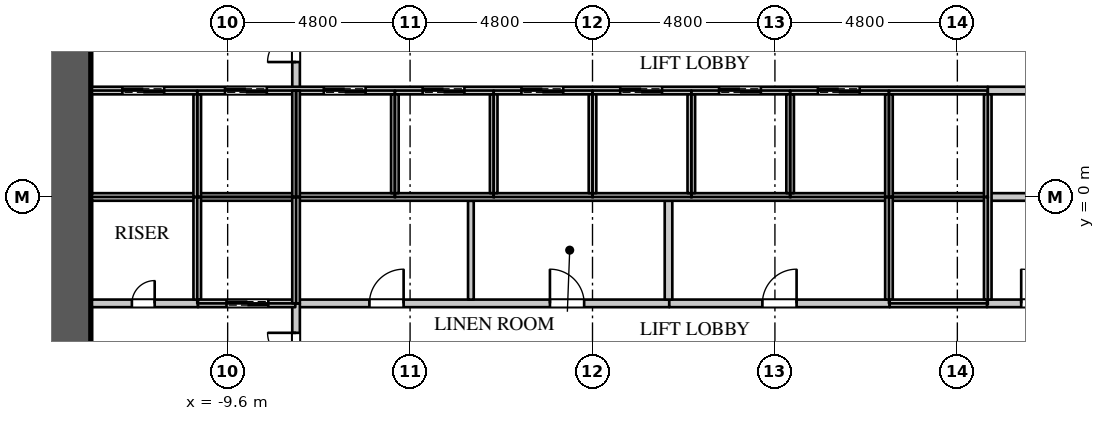
"""IFC4 building model, lengths in metres.
Left out: names, types, materials, properties, quantities, classifications, styles, units other than length and angle.
Written with IfcOpenShell. Run it as: python <this file> out.ifc"""

import sys

from ifc_helpers import new_model, si_unit, direction, frame, frame_2d, origin, place, context, subcontext, project, spatial, rectangle, extrude, element, fill, save


model = new_model("IFC4")
c1 = context("Model", 3, precision=1e-05, world=origin(), true_north=direction((0.0, 1.0)))
c2 = subcontext(c1, "Body", "Model", "MODEL_VIEW")
j1 = project(units=[si_unit("LENGTHUNIT", "METRE"), si_unit("PLANEANGLEUNIT", "RADIAN")], contexts=[c1])
p1 = place(None, origin())
s1 = spatial("IfcSite", under=j1, at=p1, CompositionType="ELEMENT")
p2 = place(p1, origin())
s2 = spatial("IfcBuilding", under=s1, at=p2, CompositionType="ELEMENT")
p3 = place(p2, frame((0.0, 0.0, 16.0)))
s3 = spatial("IfcBuildingStorey", under=s2, at=p3, CompositionType="ELEMENT", Elevation=16.0)
p4 = place(p3, frame((-13.8, -10.8, 0.0), z_axis=(0.0, 0.0, 1.0), x_axis=(0.0, 1.0, 0.0)))
e1 = element("IfcWall", 1, at=p4, inside=s3, PredefinedType="SHEAR", context=c2, shape_type="SweptSolid", body=[
    extrude(rectangle(XDim=21.6, YDim=1.2, at=frame_2d((10.8, 0.0))), origin(), (0.0, 0.0, 1.0), 5.0),
])
p5 = place(p4, frame((15.5, 0.0, 0.0)))
e2 = element("IfcOpeningElement", 2, at=p5, cuts=e1, PredefinedType="OPENING", context=c2, shape_type="SweptSolid", body=[
    extrude(rectangle(XDim=1.5, YDim=2.4, at=frame_2d((0.75, 1.2))), frame((0.0, 0.61, 0.0), z_axis=(0.0, -1.0, 0.0), x_axis=(1.0, 0.0, 0.0)), (0.0, 0.0, 1.0), 1.22),
])
p6 = place(p4, frame((4.5, 0.0, 0.0)))
e3 = element("IfcOpeningElement", 3, at=p6, cuts=e1, PredefinedType="OPENING", context=c2, shape_type="SweptSolid", body=[
    extrude(rectangle(XDim=1.5, YDim=2.4, at=frame_2d((0.75, 1.2))), frame((0.0, 0.61, 0.0), z_axis=(0.0, -1.0, 0.0), x_axis=(1.0, 0.0, 0.0)), (0.0, 0.0, 1.0), 1.22),
])
p7 = place(p3, frame((-7.82, -2.8, 0.0), z_axis=(0.0, 0.0, 1.0), x_axis=(1.0, 0.0, 0.0)))
e4 = element("IfcWall", 4, at=p7, inside=s3, PredefinedType="PARTITIONING", context=c2, shape_type="SweptSolid", body=[
    extrude(rectangle(XDim=9.84, YDim=0.2, at=frame_2d((4.92, 0.0))), origin(), (0.0, 0.0, 1.0), 4.4),
])
p8 = place(p7, frame((1.95, 0.0, 0.0)))
e5 = element("IfcOpeningElement", 5, at=p8, cuts=e4, PredefinedType="OPENING", context=c2, shape_type="SweptSolid", body=[
    extrude(rectangle(XDim=0.9, YDim=2.2, at=frame_2d((0.45, 1.1))), frame((0.0, 0.11, 0.0), z_axis=(0.0, -1.0, 0.0), x_axis=(1.0, 0.0, 0.0)), (0.0, 0.0, 1.0), 0.22),
])
p9 = place(p7, frame((6.7, 0.0, 0.0)))
e6 = element("IfcOpeningElement", 6, at=p9, cuts=e4, PredefinedType="OPENING", context=c2, shape_type="SweptSolid", body=[
    extrude(rectangle(XDim=0.9, YDim=2.2, at=frame_2d((0.45, 1.1))), frame((0.0, 0.11, 0.0), z_axis=(0.0, -1.0, 0.0), x_axis=(1.0, 0.0, 0.0)), (0.0, 0.0, 1.0), 0.22),
])
p10 = place(p3, frame((-7.8, -8.075, 0.0), z_axis=(0.0, 0.0, 1.0), x_axis=(0.0, 1.0, 0.0)))
e7 = element("IfcWall", 7, at=p10, inside=s3, PredefinedType="PARTITIONING", context=c2, shape_type="SweptSolid", body=[
    extrude(rectangle(XDim=5.275, YDim=0.2, at=frame_2d((2.637, 0.0))), origin(), (0.0, 0.0, 1.0), 4.4),
])
p11 = place(p10, frame((3.0, 0.0, 0.0)))
e8 = element("IfcOpeningElement", 8, at=p11, cuts=e7, PredefinedType="OPENING", context=c2, shape_type="SweptSolid", body=[
    extrude(rectangle(XDim=1.5, YDim=2.4, at=frame_2d((0.75, 1.2))), frame((0.0, 0.11, 0.0), z_axis=(0.0, -1.0, 0.0), x_axis=(1.0, 0.0, 0.0)), (0.0, 0.0, 1.0), 0.22),
])
p12 = place(p3, frame((-7.8, 2.8, 0.0), z_axis=(0.0, 0.0, 1.0), x_axis=(0.0, 1.0, 0.0)))
e9 = element("IfcWall", 9, at=p12, inside=s3, PredefinedType="PARTITIONING", context=c2, shape_type="SweptSolid", body=[
    extrude(rectangle(XDim=5.275, YDim=0.2, at=frame_2d((2.637, 0.0))), origin(), (0.0, 0.0, 1.0), 4.4),
])
p13 = place(p12, frame((0.75, 0.0, 0.0)))
e10 = element("IfcOpeningElement", 10, at=p13, cuts=e9, PredefinedType="OPENING", context=c2, shape_type="SweptSolid", body=[
    extrude(rectangle(XDim=1.5, YDim=2.4, at=frame_2d((0.75, 1.2))), frame((0.0, 0.11, 0.0), z_axis=(0.0, -1.0, 0.0), x_axis=(1.0, 0.0, 0.0)), (0.0, 0.0, 1.0), 0.22),
])
p14 = place(p3, frame((-3.2, -2.7, 0.0), z_axis=(0.0, 0.0, 1.0), x_axis=(0.0, 1.0, 0.0)))
e11 = element("IfcWall", 11, at=p14, inside=s3, PredefinedType="PARTITIONING", context=c2, shape_type="SweptSolid", body=[
    extrude(rectangle(XDim=2.6, YDim=0.15, at=frame_2d((1.3, 0.0))), origin(), (0.0, 0.0, 1.0), 4.4),
])
p15 = place(p3, frame((-13.17, -2.8, 0.0), z_axis=(0.0, 0.0, 1.0), x_axis=(1.0, 0.0, 0.0)))
e12 = element("IfcWall", 12, at=p15, inside=s3, PredefinedType="PARTITIONING", context=c2, shape_type="SweptSolid", body=[
    extrude(rectangle(XDim=2.79, YDim=0.2, at=frame_2d((1.395, 0.0))), origin(), (0.0, 0.0, 1.0), 4.4),
])
p16 = place(p15, frame((1.05, 0.0, 0.0)))
e13 = element("IfcOpeningElement", 13, at=p16, cuts=e12, PredefinedType="OPENING", context=c2, shape_type="SweptSolid", body=[
    extrude(rectangle(XDim=0.6, YDim=2.0, at=frame_2d((0.3, 1.0))), frame((0.0, 0.11, 0.0), z_axis=(0.0, -1.0, 0.0), x_axis=(1.0, 0.0, 0.0)), (0.0, 0.0, 1.0), 0.22),
])
p17 = place(p3, frame((2.02, -2.8, 0.0), z_axis=(0.0, 0.0, 1.0), x_axis=(1.0, 0.0, 0.0)))
e14 = element("IfcWall", 14, at=p17, inside=s3, PredefinedType="PARTITIONING", context=c2, shape_type="SweptSolid", body=[
    extrude(rectangle(XDim=5.8, YDim=0.2, at=frame_2d((2.9, 0.0))), origin(), (0.0, 0.0, 1.0), 4.4),
])
p18 = place(p17, frame((2.45, 0.0, 0.0)))
e15 = element("IfcOpeningElement", 15, at=p18, cuts=e14, PredefinedType="OPENING", context=c2, shape_type="SweptSolid", body=[
    extrude(rectangle(XDim=0.9, YDim=2.2, at=frame_2d((0.45, 1.1))), frame((0.0, 0.11, 0.0), z_axis=(0.0, -1.0, 0.0), x_axis=(1.0, 0.0, 0.0)), (0.0, 0.0, 1.0), 0.22),
])
p19 = place(p3, frame((2.0, -2.7, 0.0), z_axis=(0.0, 0.0, 1.0), x_axis=(0.0, 1.0, 0.0)))
e16 = element("IfcWall", 16, at=p19, inside=s3, PredefinedType="PARTITIONING", context=c2, shape_type="SweptSolid", body=[
    extrude(rectangle(XDim=2.6, YDim=0.2, at=frame_2d((1.3, 0.0))), origin(), (0.0, 0.0, 1.0), 4.4),
])
p20 = place(p3, frame((10.38, -2.8, 0.0), z_axis=(0.0, 0.0, 1.0), x_axis=(1.0, 0.0, 0.0)))
e17 = element("IfcWall", 17, at=p20, inside=s3, PredefinedType="PARTITIONING", context=c2, shape_type="SweptSolid", body=[
    extrude(rectangle(XDim=2.79, YDim=0.2, at=frame_2d((1.395, 0.0))), origin(), (0.0, 0.0, 1.0), 4.4),
])
p21 = place(p20, frame((0.9, 0.0, 0.0)))
e18 = element("IfcOpeningElement", 18, at=p21, cuts=e17, PredefinedType="OPENING", context=c2, shape_type="SweptSolid", body=[
    extrude(rectangle(XDim=0.9, YDim=2.2, at=frame_2d((0.45, 1.1))), frame((0.0, 0.11, 0.0), z_axis=(0.0, -1.0, 0.0), x_axis=(1.0, 0.0, 0.0)), (0.0, 0.0, 1.0), 0.22),
])
p22 = place(p3, frame((10.4, 2.8, 0.0), z_axis=(0.0, 0.0, 1.0), x_axis=(1.0, 0.0, 0.0)))
e19 = element("IfcWall", 19, at=p22, inside=s3, PredefinedType="PARTITIONING", context=c2, shape_type="SweptSolid", body=[
    extrude(rectangle(XDim=2.77, YDim=0.2, at=frame_2d((1.385, 0.0))), origin(), (0.0, 0.0, 1.0), 4.4),
])
p23 = place(p22, frame((1.05, 0.0, 0.0)))
e20 = element("IfcOpeningElement", 20, at=p23, cuts=e19, PredefinedType="OPENING", context=c2, shape_type="SweptSolid", body=[
    extrude(rectangle(XDim=0.6, YDim=2.0, at=frame_2d((0.3, 1.0))), frame((0.0, 0.11, 0.0), z_axis=(0.0, -1.0, 0.0), x_axis=(1.0, 0.0, 0.0)), (0.0, 0.0, 1.0), 0.22),
])
p24 = place(p3, frame((10.4, 0.0, 0.0), z_axis=(0.0, 0.0, 1.0), x_axis=(1.0, 0.0, 0.0)))
e21 = element("IfcWall", 21, at=p24, inside=s3, PredefinedType="PARTITIONING", context=c2, shape_type="SweptSolid", body=[
    extrude(rectangle(XDim=2.77, YDim=0.2, at=frame_2d((1.385, 0.0))), origin(), (0.0, 0.0, 1.0), 4.4),
])
p25 = place(p3, frame((-13.17, 0.0, 0.0), z_axis=(0.0, 0.0, 1.0), x_axis=(1.0, 0.0, 0.0)))
e22 = element("IfcWall", 22, at=p25, inside=s3, PredefinedType="PARTITIONING", context=c2, shape_type="SweptSolid", body=[
    extrude(rectangle(XDim=23.57, YDim=0.2, at=frame_2d((11.785, 0.0))), origin(), (0.0, 0.0, 1.0), 4.4),
])
p26 = place(p3, frame((-13.17, 2.8, 0.0), z_axis=(0.0, 0.0, 1.0), x_axis=(1.0, 0.0, 0.0)))
e23 = element("IfcWall", 23, at=p26, inside=s3, PredefinedType="PARTITIONING", context=c2, shape_type="SweptSolid", body=[
    extrude(rectangle(XDim=23.57, YDim=0.2, at=frame_2d((11.785, 0.0))), origin(), (0.0, 0.0, 1.0), 4.4),
])
p27 = place(p26, frame((0.8, 0.0, 0.0)))
e24 = element("IfcOpeningElement", 24, at=p27, cuts=e23, PredefinedType="OPENING", context=c2, shape_type="SweptSolid", body=[
    extrude(rectangle(XDim=1.1, YDim=2.2, at=frame_2d((0.55, 1.1))), frame((0.0, 0.11, 0.0), z_axis=(0.0, -1.0, 0.0), x_axis=(1.0, 0.0, 0.0)), (0.0, 0.0, 1.0), 0.22),
])
p28 = place(p26, frame((3.5, 0.0, 0.0)))
e25 = element("IfcOpeningElement", 25, at=p28, cuts=e23, PredefinedType="OPENING", context=c2, shape_type="SweptSolid", body=[
    extrude(rectangle(XDim=1.1, YDim=2.2, at=frame_2d((0.55, 1.1))), frame((0.0, 0.11, 0.0), z_axis=(0.0, -1.0, 0.0), x_axis=(1.0, 0.0, 0.0)), (0.0, 0.0, 1.0), 0.22),
])
p29 = place(p26, frame((6.1, 0.0, 0.0)))
e26 = element("IfcOpeningElement", 26, at=p29, cuts=e23, PredefinedType="OPENING", context=c2, shape_type="SweptSolid", body=[
    extrude(rectangle(XDim=1.1, YDim=2.2, at=frame_2d((0.55, 1.1))), frame((0.0, 0.11, 0.0), z_axis=(0.0, -1.0, 0.0), x_axis=(1.0, 0.0, 0.0)), (0.0, 0.0, 1.0), 0.22),
])
p30 = place(p26, frame((8.7, 0.0, 0.0)))
e27 = element("IfcOpeningElement", 27, at=p30, cuts=e23, PredefinedType="OPENING", context=c2, shape_type="SweptSolid", body=[
    extrude(rectangle(XDim=1.1, YDim=2.2, at=frame_2d((0.55, 1.1))), frame((0.0, 0.11, 0.0), z_axis=(0.0, -1.0, 0.0), x_axis=(1.0, 0.0, 0.0)), (0.0, 0.0, 1.0), 0.22),
])
p31 = place(p26, frame((11.3, 0.0, 0.0)))
e28 = element("IfcOpeningElement", 28, at=p31, cuts=e23, PredefinedType="OPENING", context=c2, shape_type="SweptSolid", body=[
    extrude(rectangle(XDim=1.1, YDim=2.2, at=frame_2d((0.55, 1.1))), frame((0.0, 0.11, 0.0), z_axis=(0.0, -1.0, 0.0), x_axis=(1.0, 0.0, 0.0)), (0.0, 0.0, 1.0), 0.22),
])
p32 = place(p26, frame((13.9, 0.0, 0.0)))
e29 = element("IfcOpeningElement", 29, at=p32, cuts=e23, PredefinedType="OPENING", context=c2, shape_type="SweptSolid", body=[
    extrude(rectangle(XDim=1.1, YDim=2.2, at=frame_2d((0.55, 1.1))), frame((0.0, 0.11, 0.0), z_axis=(0.0, -1.0, 0.0), x_axis=(1.0, 0.0, 0.0)), (0.0, 0.0, 1.0), 0.22),
])
p33 = place(p26, frame((16.5, 0.0, 0.0)))
e30 = element("IfcOpeningElement", 30, at=p33, cuts=e23, PredefinedType="OPENING", context=c2, shape_type="SweptSolid", body=[
    extrude(rectangle(XDim=1.1, YDim=2.2, at=frame_2d((0.55, 1.1))), frame((0.0, 0.11, 0.0), z_axis=(0.0, -1.0, 0.0), x_axis=(1.0, 0.0, 0.0)), (0.0, 0.0, 1.0), 0.22),
])
p34 = place(p26, frame((19.1, 0.0, 0.0)))
e31 = element("IfcOpeningElement", 31, at=p34, cuts=e23, PredefinedType="OPENING", context=c2, shape_type="SweptSolid", body=[
    extrude(rectangle(XDim=1.1, YDim=2.2, at=frame_2d((0.55, 1.1))), frame((0.0, 0.11, 0.0), z_axis=(0.0, -1.0, 0.0), x_axis=(1.0, 0.0, 0.0)), (0.0, 0.0, 1.0), 0.22),
])
p35 = place(p3, frame((-10.4, -2.7, 0.0), z_axis=(0.0, 0.0, 1.0), x_axis=(0.0, 1.0, 0.0)))
e32 = element("IfcWall", 32, at=p35, inside=s3, PredefinedType="PARTITIONING", context=c2, shape_type="SweptSolid", body=[
    extrude(rectangle(XDim=2.7, YDim=0.2, at=frame_2d((1.35, 0.0))), origin(), (0.0, 0.0, 1.0), 4.4),
])
p36 = place(p3, frame((-10.38, -2.8, 0.0), z_axis=(0.0, 0.0, 1.0), x_axis=(1.0, 0.0, 0.0)))
e33 = element("IfcWall", 33, at=p36, inside=s3, PredefinedType="PARTITIONING", context=c2, shape_type="SweptSolid", body=[
    extrude(rectangle(XDim=2.56, YDim=0.2, at=frame_2d((1.28, 0.0))), origin(), (0.0, 0.0, 1.0), 4.4),
])
p37 = place(p36, frame((0.75, 0.0, 0.0)))
e34 = element("IfcOpeningElement", 34, at=p37, cuts=e33, PredefinedType="OPENING", context=c2, shape_type="SweptSolid", body=[
    extrude(rectangle(XDim=1.1, YDim=2.2, at=frame_2d((0.55, 1.1))), frame((0.0, 0.11, 0.0), z_axis=(0.0, -1.0, 0.0), x_axis=(1.0, 0.0, 0.0)), (0.0, 0.0, 1.0), 0.22),
])
p38 = place(p3, frame((-10.4, 0.0, 0.0), z_axis=(0.0, 0.0, 1.0), x_axis=(0.0, 1.0, 0.0)))
e35 = element("IfcWall", 35, at=p38, inside=s3, PredefinedType="PARTITIONING", context=c2, shape_type="SweptSolid", body=[
    extrude(rectangle(XDim=2.7, YDim=0.2, at=frame_2d((1.35, 0.0))), origin(), (0.0, 0.0, 1.0), 4.4),
])
for number, where, z_axis, x_axis in (
    (36, (-7.8, -2.8, 0.0), (0.0, 0.0, 1.0), (0.0, 1.0, 0.0)),
    (37, (-7.8, 0.0, 0.0), (0.0, 0.0, 1.0), (0.0, 1.0, 0.0)),
):
    element("IfcWall", number, at=place(p3, frame(where, z_axis=z_axis, x_axis=x_axis)), inside=s3, PredefinedType="PARTITIONING", context=c2, shape_type="SweptSolid", body=[
        extrude(rectangle(XDim=2.8, YDim=0.2, at=frame_2d((1.4, 0.0))), origin(), (0.0, 0.0, 1.0), 4.4),
    ])
for number, where, z_axis, x_axis in (
    (38, (-5.2, 0.1, 0.0), (0.0, 0.0, 1.0), (0.0, 1.0, 0.0)),
    (39, (-2.6, 0.1, 0.0), (0.0, 0.0, 1.0), (0.0, 1.0, 0.0)),
    (40, (0.0, 0.1, 0.0), (0.0, 0.0, 1.0), (0.0, 1.0, 0.0)),
    (41, (2.6, 0.1, 0.0), (0.0, 0.0, 1.0), (0.0, 1.0, 0.0)),
    (42, (5.2, 0.1, 0.0), (0.0, 0.0, 1.0), (0.0, 1.0, 0.0)),
):
    element("IfcWall", number, at=place(p3, frame(where, z_axis=z_axis, x_axis=x_axis)), inside=s3, PredefinedType="PARTITIONING", context=c2, shape_type="SweptSolid", body=[
        extrude(rectangle(XDim=2.6, YDim=0.2, at=frame_2d((1.3, 0.0))), origin(), (0.0, 0.0, 1.0), 4.4),
    ])
p39 = place(p3, frame((7.8, -2.7, 0.0), z_axis=(0.0, 0.0, 1.0), x_axis=(0.0, 1.0, 0.0)))
e43 = element("IfcWall", 43, at=p39, inside=s3, PredefinedType="PARTITIONING", context=c2, shape_type="SweptSolid", body=[
    extrude(rectangle(XDim=2.7, YDim=0.2, at=frame_2d((1.35, 0.0))), origin(), (0.0, 0.0, 1.0), 4.4),
])
p40 = place(p3, frame((7.82, -2.8, 0.0), z_axis=(0.0, 0.0, 1.0), x_axis=(1.0, 0.0, 0.0)))
e44 = element("IfcWall", 44, at=p40, inside=s3, PredefinedType="PARTITIONING", context=c2, shape_type="SweptSolid", body=[
    extrude(rectangle(XDim=2.56, YDim=0.2, at=frame_2d((1.28, 0.0))), origin(), (0.0, 0.0, 1.0), 4.4),
])
p41 = place(p3, frame((7.8, 0.0, 0.0), z_axis=(0.0, 0.0, 1.0), x_axis=(0.0, 1.0, 0.0)))
e45 = element("IfcWall", 45, at=p41, inside=s3, PredefinedType="PARTITIONING", context=c2, shape_type="SweptSolid", body=[
    extrude(rectangle(XDim=2.7, YDim=0.2, at=frame_2d((1.35, 0.0))), origin(), (0.0, 0.0, 1.0), 4.4),
])
p42 = place(p3, frame((10.4, -2.7, 0.0), z_axis=(0.0, 0.0, 1.0), x_axis=(0.0, 1.0, 0.0)))
e46 = element("IfcWall", 46, at=p42, inside=s3, PredefinedType="PARTITIONING", context=c2, shape_type="SweptSolid", body=[
    extrude(rectangle(XDim=5.4, YDim=0.2, at=frame_2d((2.7, 0.0))), origin(), (0.0, 0.0, 1.0), 4.4),
])
p43 = place(p16, origin())
e47 = element("IfcDoor", 47, at=p43, inside=s3, OperationType="SINGLE_SWING_RIGHT", PredefinedType="DOOR", context=c2, shape_type="SweptSolid", body=[
    extrude(rectangle(XDim=0.6, YDim=2.0, at=frame_2d((0.3, 1.0))), frame((0.0, 0.025, 0.0), z_axis=(0.0, -1.0, 0.0), x_axis=(1.0, 0.0, 0.0)), (0.0, 0.0, 1.0), 0.05),
])
fill(e13, e47)
p44 = place(p21, origin())
e48 = element("IfcDoor", 48, at=p44, inside=s3, OperationType="SINGLE_SWING_LEFT", PredefinedType="DOOR", context=c2, shape_type="SweptSolid", body=[
    extrude(rectangle(XDim=0.9, YDim=2.2, at=frame_2d((0.45, 1.1))), frame((0.0, 0.025, 0.0), z_axis=(0.0, -1.0, 0.0), x_axis=(1.0, 0.0, 0.0)), (0.0, 0.0, 1.0), 0.05),
])
fill(e18, e48)
p45 = place(p8, origin())
e49 = element("IfcDoor", 49, at=p45, inside=s3, OperationType="SINGLE_SWING_RIGHT", PredefinedType="DOOR", context=c2, shape_type="SweptSolid", body=[
    extrude(rectangle(XDim=0.9, YDim=2.2, at=frame_2d((0.45, 1.1))), frame((0.0, 0.025, 0.0), z_axis=(0.0, -1.0, 0.0), x_axis=(1.0, 0.0, 0.0)), (0.0, 0.0, 1.0), 0.05),
])
fill(e5, e49)
p46 = place(p9, origin())
e50 = element("IfcDoor", 50, at=p46, inside=s3, OperationType="SINGLE_SWING_LEFT", PredefinedType="DOOR", context=c2, shape_type="SweptSolid", body=[
    extrude(rectangle(XDim=0.9, YDim=2.2, at=frame_2d((0.45, 1.1))), frame((0.0, 0.025, 0.0), z_axis=(0.0, -1.0, 0.0), x_axis=(1.0, 0.0, 0.0)), (0.0, 0.0, 1.0), 0.05),
])
fill(e6, e50)
p47 = place(p18, origin())
e51 = element("IfcDoor", 51, at=p47, inside=s3, OperationType="SINGLE_SWING_RIGHT", PredefinedType="DOOR", context=c2, shape_type="SweptSolid", body=[
    extrude(rectangle(XDim=0.9, YDim=2.2, at=frame_2d((0.45, 1.1))), frame((0.0, 0.025, 0.0), z_axis=(0.0, -1.0, 0.0), x_axis=(1.0, 0.0, 0.0)), (0.0, 0.0, 1.0), 0.05),
])
fill(e15, e51)
p48 = place(p27, origin())
e52 = element("IfcDoor", 52, at=p48, inside=s3, OperationType="DOUBLE_DOOR_SLIDING", PredefinedType="DOOR", context=c2, shape_type="SweptSolid", body=[
    extrude(rectangle(XDim=1.1, YDim=2.2, at=frame_2d((0.55, 1.1))), frame((0.0, 0.025, 0.0), z_axis=(0.0, -1.0, 0.0), x_axis=(1.0, 0.0, 0.0)), (0.0, 0.0, 1.0), 0.05),
])
fill(e24, e52)
p49 = place(p28, origin())
e53 = element("IfcDoor", 53, at=p49, inside=s3, OperationType="DOUBLE_DOOR_SLIDING", PredefinedType="DOOR", context=c2, shape_type="SweptSolid", body=[
    extrude(rectangle(XDim=1.1, YDim=2.2, at=frame_2d((0.55, 1.1))), frame((0.0, 0.025, 0.0), z_axis=(0.0, -1.0, 0.0), x_axis=(1.0, 0.0, 0.0)), (0.0, 0.0, 1.0), 0.05),
])
fill(e25, e53)
p50 = place(p37, origin())
e54 = element("IfcDoor", 54, at=p50, inside=s3, OperationType="DOUBLE_DOOR_SLIDING", PredefinedType="DOOR", context=c2, shape_type="SweptSolid", body=[
    extrude(rectangle(XDim=1.1, YDim=2.2, at=frame_2d((0.55, 1.1))), frame((0.0, 0.025, 0.0), z_axis=(0.0, -1.0, 0.0), x_axis=(1.0, 0.0, 0.0)), (0.0, 0.0, 1.0), 0.05),
])
fill(e34, e54)
p51 = place(p29, origin())
e55 = element("IfcDoor", 55, at=p51, inside=s3, OperationType="DOUBLE_DOOR_SLIDING", PredefinedType="DOOR", context=c2, shape_type="SweptSolid", body=[
    extrude(rectangle(XDim=1.1, YDim=2.2, at=frame_2d((0.55, 1.1))), frame((0.0, 0.025, 0.0), z_axis=(0.0, -1.0, 0.0), x_axis=(1.0, 0.0, 0.0)), (0.0, 0.0, 1.0), 0.05),
])
fill(e26, e55)
p52 = place(p30, origin())
e56 = element("IfcDoor", 56, at=p52, inside=s3, OperationType="DOUBLE_DOOR_SLIDING", PredefinedType="DOOR", context=c2, shape_type="SweptSolid", body=[
    extrude(rectangle(XDim=1.1, YDim=2.2, at=frame_2d((0.55, 1.1))), frame((0.0, 0.025, 0.0), z_axis=(0.0, -1.0, 0.0), x_axis=(1.0, 0.0, 0.0)), (0.0, 0.0, 1.0), 0.05),
])
fill(e27, e56)
p53 = place(p31, origin())
e57 = element("IfcDoor", 57, at=p53, inside=s3, OperationType="DOUBLE_DOOR_SLIDING", PredefinedType="DOOR", context=c2, shape_type="SweptSolid", body=[
    extrude(rectangle(XDim=1.1, YDim=2.2, at=frame_2d((0.55, 1.1))), frame((0.0, 0.025, 0.0), z_axis=(0.0, -1.0, 0.0), x_axis=(1.0, 0.0, 0.0)), (0.0, 0.0, 1.0), 0.05),
])
fill(e28, e57)
p54 = place(p32, origin())
e58 = element("IfcDoor", 58, at=p54, inside=s3, OperationType="DOUBLE_DOOR_SLIDING", PredefinedType="DOOR", context=c2, shape_type="SweptSolid", body=[
    extrude(rectangle(XDim=1.1, YDim=2.2, at=frame_2d((0.55, 1.1))), frame((0.0, 0.025, 0.0), z_axis=(0.0, -1.0, 0.0), x_axis=(1.0, 0.0, 0.0)), (0.0, 0.0, 1.0), 0.05),
])
fill(e29, e58)
p55 = place(p33, origin())
e59 = element("IfcDoor", 59, at=p55, inside=s3, OperationType="DOUBLE_DOOR_SLIDING", PredefinedType="DOOR", context=c2, shape_type="SweptSolid", body=[
    extrude(rectangle(XDim=1.1, YDim=2.2, at=frame_2d((0.55, 1.1))), frame((0.0, 0.025, 0.0), z_axis=(0.0, -1.0, 0.0), x_axis=(1.0, 0.0, 0.0)), (0.0, 0.0, 1.0), 0.05),
])
fill(e30, e59)
p56 = place(p34, origin())
e60 = element("IfcDoor", 60, at=p56, inside=s3, OperationType="DOUBLE_DOOR_SLIDING", PredefinedType="DOOR", context=c2, shape_type="SweptSolid", body=[
    extrude(rectangle(XDim=1.1, YDim=2.2, at=frame_2d((0.55, 1.1))), frame((0.0, 0.025, 0.0), z_axis=(0.0, -1.0, 0.0), x_axis=(1.0, 0.0, 0.0)), (0.0, 0.0, 1.0), 0.05),
])
fill(e31, e60)
p57 = place(p13, origin())
e61 = element("IfcDoor", 61, at=p57, inside=s3, OperationType="DOUBLE_DOOR_SINGLE_SWING", PredefinedType="DOOR", context=c2, shape_type="SweptSolid", body=[
    extrude(rectangle(XDim=1.5, YDim=2.4, at=frame_2d((0.75, 1.2))), frame((0.0, 0.025, 0.0), z_axis=(0.0, -1.0, 0.0), x_axis=(1.0, 0.0, 0.0)), (0.0, 0.0, 1.0), 0.05),
])
fill(e10, e61)
p58 = place(p11, origin())
e62 = element("IfcDoor", 62, at=p58, inside=s3, OperationType="DOUBLE_DOOR_SINGLE_SWING", PredefinedType="DOOR", context=c2, shape_type="SweptSolid", body=[
    extrude(rectangle(XDim=1.5, YDim=2.4, at=frame_2d((0.75, 1.2))), frame((0.0, 0.025, 0.0), z_axis=(0.0, -1.0, 0.0), x_axis=(1.0, 0.0, 0.0)), (0.0, 0.0, 1.0), 0.05),
])
fill(e8, e62)
save(model, sys.argv[1])
